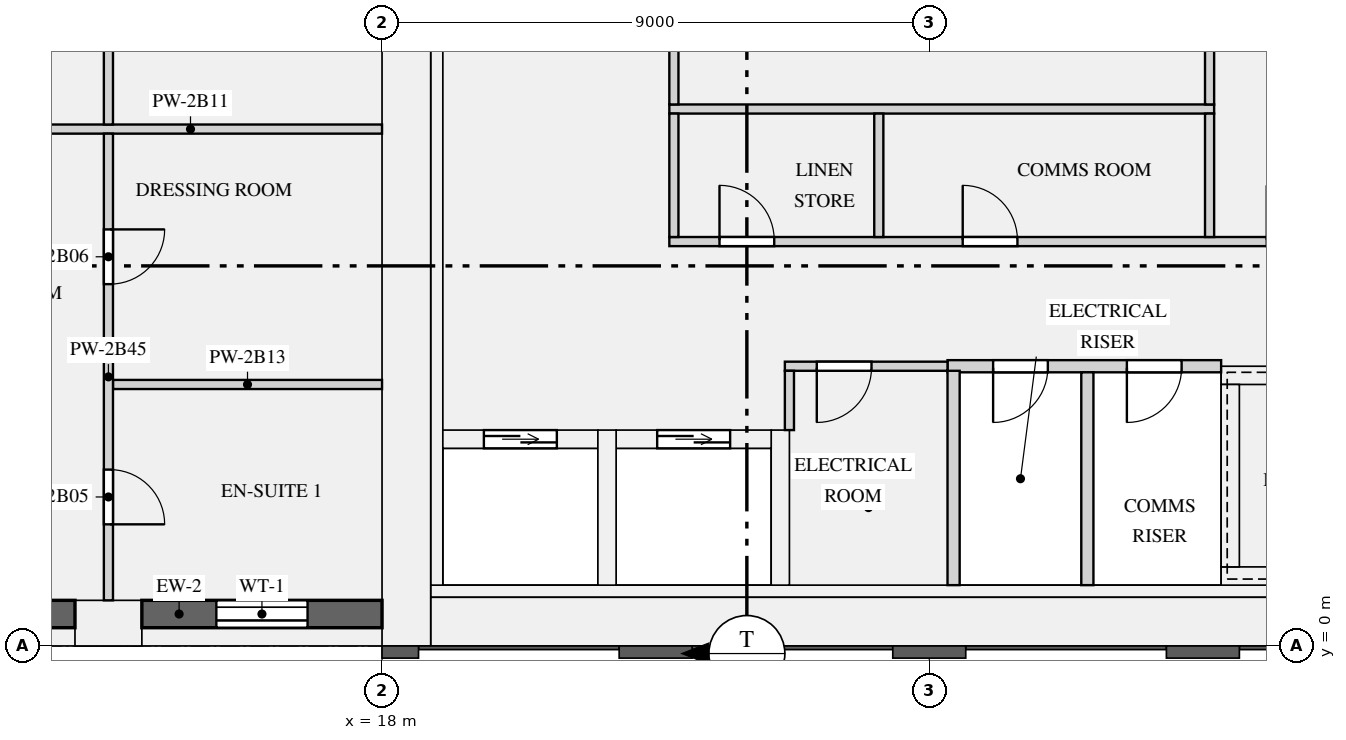
"""IFC4 building model, lengths in metres.
Left out: names, types, materials, properties, quantities, classifications, styles, units other than length and angle.
Written with IfcOpenShell. Run it as: python <this file> out.ifc"""

import sys

from ifc_helpers import new_model, si_unit, direction, frame, frame_2d, origin, origin_2d, place, context, subcontext, project, spatial, rectangle, extrude, element, fill, save


model = new_model("IFC4")
c1 = context("Model", 3, precision=1e-05, world=origin(), true_north=direction((0.0, 1.0)))
c2 = subcontext(c1, "Body", "Model", "MODEL_VIEW")
j1 = project(units=[si_unit("LENGTHUNIT", "METRE"), si_unit("PLANEANGLEUNIT", "RADIAN")], contexts=[c1])
p1 = place(None, origin())
s1 = spatial("IfcSite", under=j1, at=p1, CompositionType="ELEMENT")
p2 = place(p1, origin())
s2 = spatial("IfcBuilding", under=s1, at=p2, CompositionType="ELEMENT")
p3 = place(p2, frame((0.0, 0.0, 93.0)))
s3 = spatial("IfcBuildingStorey", under=s2, at=p3, CompositionType="ELEMENT", Elevation=93.0)
p4 = place(p3, frame((13.5, 0.375, 0.0), z_axis=(0.0, 0.0, 1.0), x_axis=(1.0, 0.0, 0.0)))
e1 = element("IfcColumn", 1, at=p4, inside=s3, PredefinedType="USERDEFINED", context=c2, shape_type="SweptSolid", body=[
    extrude(rectangle(XDim=1.1, YDim=0.75, at=origin_2d()), origin(), (0.0, 0.0, 1.0), 3.15),
])
p5 = place(p3, frame((18.4, 0.0, 0.0), z_axis=(0.0, 0.0, 1.0), x_axis=(0.0, 1.0, 0.0)))
e2 = element("IfcWall", 2, at=p5, inside=s3, PredefinedType="SHEAR", context=c2, shape_type="SweptSolid", body=[
    extrude(rectangle(XDim=12.5, YDim=0.8, at=frame_2d((6.25, 0.0))), origin(), (0.0, 0.0, 1.0), 3.15),
])
p6 = place(p3, frame((18.8, 0.4, 0.0), z_axis=(0.0, 0.0, 1.0), x_axis=(1.0, 0.0, 0.0)))
e3 = element("IfcWall", 3, at=p6, inside=s3, PredefinedType="SHEAR", context=c2, shape_type="SweptSolid", body=[
    extrude(rectangle(XDim=34.4, YDim=0.8, at=frame_2d((17.2, 0.0))), origin(), (0.0, 0.0, 1.0), 3.15),
])
p7 = place(p3, frame((18.9, 1.0, 0.0), z_axis=(0.0, 0.0, 1.0), x_axis=(0.0, 1.0, 0.0)))
e4 = element("IfcWall", 4, at=p7, inside=s3, PredefinedType="SHEAR", context=c2, shape_type="SweptSolid", body=[
    extrude(rectangle(XDim=10.9, YDim=0.2, at=frame_2d((5.45, 0.0))), origin(), (0.0, 0.0, 1.0), 3.15),
])
p8 = place(p3, frame((18.8, 0.9, 0.0), z_axis=(0.0, 0.0, 1.0), x_axis=(1.0, 0.0, 0.0)))
e5 = element("IfcWall", 5, at=p8, inside=s3, PredefinedType="SHEAR", context=c2, shape_type="SweptSolid", body=[
    extrude(rectangle(XDim=34.4, YDim=0.2, at=frame_2d((17.2, 0.0))), origin(), (0.0, 0.0, 1.0), 3.15),
])
p9 = place(p3, frame((19.0, 3.4, 0.0), z_axis=(0.0, 0.0, 1.0), x_axis=(1.0, 0.0, 0.0)))
e6 = element("IfcWall", 6, at=p9, inside=s3, PredefinedType="SHEAR", context=c2, shape_type="SweptSolid", body=[
    extrude(rectangle(XDim=2.55, YDim=0.3, at=frame_2d((1.275, 0.0))), origin(), (0.0, 0.0, 1.0), 3.15),
])
p10 = place(p9, frame((0.675, 0.0, 0.0)))
e7 = element("IfcOpeningElement", 7, at=p10, cuts=e6, PredefinedType="OPENING", context=c2, shape_type="SweptSolid", body=[
    extrude(rectangle(XDim=1.2, YDim=2.1, at=frame_2d((0.6, 1.05))), frame((0.0, 0.16, 0.0), z_axis=(0.0, -1.0, 0.0), x_axis=(1.0, 0.0, 0.0)), (0.0, 0.0, 1.0), 0.32),
])
p11 = place(p3, frame((21.85, 3.4, 0.0), z_axis=(0.0, 0.0, 1.0), x_axis=(1.0, 0.0, 0.0)))
e8 = element("IfcWall", 8, at=p11, inside=s3, PredefinedType="SHEAR", context=c2, shape_type="SweptSolid", body=[
    extrude(rectangle(XDim=2.55, YDim=0.3, at=frame_2d((1.275, 0.0))), origin(), (0.0, 0.0, 1.0), 3.15),
])
p12 = place(p11, frame((0.675, 0.0, 0.0)))
e9 = element("IfcOpeningElement", 9, at=p12, cuts=e8, PredefinedType="OPENING", context=c2, shape_type="SweptSolid", body=[
    extrude(rectangle(XDim=1.2, YDim=2.1, at=frame_2d((0.6, 1.05))), frame((0.0, 0.16, 0.0), z_axis=(0.0, -1.0, 0.0), x_axis=(1.0, 0.0, 0.0)), (0.0, 0.0, 1.0), 0.32),
])
for number, where, z_axis, x_axis in (
    (10, (21.7, 1.0, 0.0), (0.0, 0.0, 1.0), (0.0, 1.0, 0.0)),
    (11, (24.55, 1.0, 0.0), (0.0, 0.0, 1.0), (0.0, 1.0, 0.0)),
):
    element("IfcWall", number, at=place(p3, frame(where, z_axis=z_axis, x_axis=x_axis)), inside=s3, PredefinedType="SHEAR", context=c2, shape_type="SweptSolid", body=[
        extrude(rectangle(XDim=2.55, YDim=0.3, at=frame_2d((1.275, 0.0))), origin(), (0.0, 0.0, 1.0), 3.15),
    ])
p13 = place(p3, frame((31.8, 1.15, 0.0), z_axis=(0.0, 0.0, 1.0), x_axis=(1.0, 0.0, 0.0)))
e12 = element("IfcWall", 12, at=p13, inside=s3, PredefinedType="SHEAR", context=c2, shape_type="SweptSolid", body=[
    extrude(rectangle(XDim=8.4, YDim=0.3, at=frame_2d((4.2, 0.0))), origin(), (0.0, 0.0, 1.0), 3.15),
])
p14 = place(p3, frame((31.8, 4.45, 0.0), z_axis=(0.0, 0.0, 1.0), x_axis=(1.0, 0.0, 0.0)))
e13 = element("IfcWall", 13, at=p14, inside=s3, PredefinedType="SHEAR", context=c2, shape_type="SweptSolid", body=[
    extrude(rectangle(XDim=8.4, YDim=0.3, at=frame_2d((4.2, 0.0))), origin(), (0.0, 0.0, 1.0), 3.15),
])
p15 = place(p14, frame((6.8, 0.0, 0.0)))
e14 = element("IfcOpeningElement", 14, at=p15, cuts=e13, PredefinedType="OPENING", context=c2, shape_type="SweptSolid", body=[
    extrude(rectangle(XDim=1.1, YDim=2.1, at=frame_2d((0.55, 1.05))), frame((0.0, 0.16, 0.0), z_axis=(0.0, -1.0, 0.0), x_axis=(1.0, 0.0, 0.0)), (0.0, 0.0, 1.0), 0.32),
])
p16 = place(p3, frame((31.95, 1.3, 0.0), z_axis=(0.0, 0.0, 1.0), x_axis=(0.0, 1.0, 0.0)))
e15 = element("IfcWall", 15, at=p16, inside=s3, PredefinedType="SHEAR", context=c2, shape_type="SweptSolid", body=[
    extrude(rectangle(XDim=3.0, YDim=0.3, at=frame_2d((1.5, 0.0))), origin(), (0.0, 0.0, 1.0), 3.15),
])
p17 = place(p3, frame((10.1, 0.525, 0.9), z_axis=(0.0, 0.0, 1.0), x_axis=(1.0, 0.0, 0.0)))
e16 = element("IfcWall", 16, at=p17, inside=s3, PredefinedType="SOLIDWALL", context=c2, shape_type="SweptSolid", body=[
    extrude(rectangle(XDim=2.85, YDim=0.45, at=frame_2d((1.425, 0.0))), origin(), (0.0, 0.0, 1.0), 1.93),
])
p18 = place(p17, frame((0.675, 0.0, 0.15)))
e17 = element("IfcOpeningElement", 17, at=p18, cuts=e16, PredefinedType="OPENING", context=c2, shape_type="SweptSolid", body=[
    extrude(rectangle(XDim=1.5, YDim=1.5, at=frame_2d((0.75, 0.75))), frame((0.0, 0.235, 0.0), z_axis=(0.0, -1.0, 0.0), x_axis=(1.0, 0.0, 0.0)), (0.0, 0.0, 1.0), 0.47),
])
p19 = place(p3, frame((14.05, 0.525, 0.9), z_axis=(0.0, 0.0, 1.0), x_axis=(1.0, 0.0, 0.0)))
e18 = element("IfcWall", 18, at=p19, inside=s3, PredefinedType="SOLIDWALL", context=c2, shape_type="SweptSolid", body=[
    extrude(rectangle(XDim=3.95, YDim=0.45, at=frame_2d((1.975, 0.0))), origin(), (0.0, 0.0, 1.0), 1.93),
])
p20 = place(p19, frame((1.225, 0.0, 0.15)))
e19 = element("IfcOpeningElement", 19, at=p20, cuts=e18, PredefinedType="OPENING", context=c2, shape_type="SweptSolid", body=[
    extrude(rectangle(XDim=1.5, YDim=1.5, at=frame_2d((0.75, 0.75))), frame((0.0, 0.235, 0.0), z_axis=(0.0, -1.0, 0.0), x_axis=(1.0, 0.0, 0.0)), (0.0, 0.0, 1.0), 0.47),
])
p21 = place(p3, frame((27.3, 4.6, 0.0), z_axis=(0.0, 0.0, 1.0), x_axis=(1.0, 0.0, 0.0)))
e20 = element("IfcWall", 20, at=p21, inside=s3, PredefinedType="PARTITIONING", context=c2, shape_type="SweptSolid", body=[
    extrude(rectangle(XDim=4.5, YDim=0.2, at=frame_2d((2.25, 0.0))), origin(), (0.0, 0.0, 1.0), 2.83),
])
p22 = place(p21, frame((0.75, 0.0, 0.0)))
e21 = element("IfcOpeningElement", 21, at=p22, cuts=e20, PredefinedType="OPENING", context=c2, shape_type="SweptSolid", body=[
    extrude(rectangle(XDim=0.9, YDim=2.1, at=frame_2d((0.45, 1.05))), frame((0.0, 0.11, 0.0), z_axis=(0.0, -1.0, 0.0), x_axis=(1.0, 0.0, 0.0)), (0.0, 0.0, 1.0), 0.22),
])
p23 = place(p21, frame((2.95, 0.0, 0.0)))
e22 = element("IfcOpeningElement", 22, at=p23, cuts=e20, PredefinedType="OPENING", context=c2, shape_type="SweptSolid", body=[
    extrude(rectangle(XDim=0.9, YDim=2.1, at=frame_2d((0.45, 1.05))), frame((0.0, 0.11, 0.0), z_axis=(0.0, -1.0, 0.0), x_axis=(1.0, 0.0, 0.0)), (0.0, 0.0, 1.0), 0.22),
])
p24 = place(p3, frame((24.625, 4.6, 0.0), z_axis=(0.0, 0.0, 1.0), x_axis=(1.0, 0.0, 0.0)))
e23 = element("IfcWall", 23, at=p24, inside=s3, PredefinedType="PARTITIONING", context=c2, shape_type="SweptSolid", body=[
    extrude(rectangle(XDim=2.675, YDim=0.15, at=frame_2d((1.337, 0.0))), origin(), (0.0, 0.0, 1.0), 2.83),
])
p25 = place(p24, frame((0.525, 0.0, 0.0)))
e24 = element("IfcOpeningElement", 24, at=p25, cuts=e23, PredefinedType="OPENING", context=c2, shape_type="SweptSolid", body=[
    extrude(rectangle(XDim=0.9, YDim=2.1, at=frame_2d((0.45, 1.05))), frame((0.0, 0.085, 0.0), z_axis=(0.0, -1.0, 0.0), x_axis=(1.0, 0.0, 0.0)), (0.0, 0.0, 1.0), 0.17),
])
p26 = place(p3, frame((22.725, 6.65, 0.0), z_axis=(0.0, 0.0, 1.0), x_axis=(1.0, 0.0, 0.0)))
e25 = element("IfcWall", 25, at=p26, inside=s3, PredefinedType="PARTITIONING", context=c2, shape_type="SweptSolid", body=[
    extrude(rectangle(XDim=19.8, YDim=0.15, at=frame_2d((9.9, 0.0))), origin(), (0.0, 0.0, 1.0), 2.83),
])
p27 = place(p26, frame((0.825, 0.0, 0.0)))
e26 = element("IfcOpeningElement", 26, at=p27, cuts=e25, PredefinedType="OPENING", context=c2, shape_type="SweptSolid", body=[
    extrude(rectangle(XDim=0.9, YDim=2.1, at=frame_2d((0.45, 1.05))), frame((0.0, 0.085, 0.0), z_axis=(0.0, -1.0, 0.0), x_axis=(1.0, 0.0, 0.0)), (0.0, 0.0, 1.0), 0.17),
])
p28 = place(p26, frame((4.825, 0.0, 0.0)))
e27 = element("IfcOpeningElement", 27, at=p28, cuts=e25, PredefinedType="OPENING", context=c2, shape_type="SweptSolid", body=[
    extrude(rectangle(XDim=0.9, YDim=2.1, at=frame_2d((0.45, 1.05))), frame((0.0, 0.085, 0.0), z_axis=(0.0, -1.0, 0.0), x_axis=(1.0, 0.0, 0.0)), (0.0, 0.0, 1.0), 0.17),
])
p29 = place(p26, frame((9.825, 0.0, 0.0)))
e28 = element("IfcOpeningElement", 28, at=p29, cuts=e25, PredefinedType="OPENING", context=c2, shape_type="SweptSolid", body=[
    extrude(rectangle(XDim=0.9, YDim=2.1, at=frame_2d((0.45, 1.05))), frame((0.0, 0.085, 0.0), z_axis=(0.0, -1.0, 0.0), x_axis=(1.0, 0.0, 0.0)), (0.0, 0.0, 1.0), 0.17),
])
p30 = place(p26, frame((14.475, 0.0, 0.0)))
e29 = element("IfcOpeningElement", 29, at=p30, cuts=e25, PredefinedType="OPENING", context=c2, shape_type="SweptSolid", body=[
    extrude(rectangle(XDim=0.9, YDim=2.1, at=frame_2d((0.45, 1.05))), frame((0.0, 0.085, 0.0), z_axis=(0.0, -1.0, 0.0), x_axis=(1.0, 0.0, 0.0)), (0.0, 0.0, 1.0), 0.17),
])
p31 = place(p3, frame((22.725, 8.83, 0.0), z_axis=(0.0, 0.0, 1.0), x_axis=(1.0, 0.0, 0.0)))
e30 = element("IfcWall", 30, at=p31, inside=s3, PredefinedType="PARTITIONING", context=c2, shape_type="SweptSolid", body=[
    extrude(rectangle(XDim=8.96, YDim=0.15, at=frame_2d((4.48, 0.0))), origin(), (0.0, 0.0, 1.0), 2.83),
])
p32 = place(p3, frame((27.4, 1.0, 0.0), z_axis=(0.0, 0.0, 1.0), x_axis=(0.0, 1.0, 0.0)))
e31 = element("IfcWall", 31, at=p32, inside=s3, PredefinedType="PARTITIONING", context=c2, shape_type="SweptSolid", body=[
    extrude(rectangle(XDim=3.525, YDim=0.2, at=frame_2d((1.762, 0.0))), origin(), (0.0, 0.0, 1.0), 2.83),
])
p33 = place(p3, frame((29.6, 1.0, 0.0), z_axis=(0.0, 0.0, 1.0), x_axis=(0.0, 1.0, 0.0)))
e32 = element("IfcWall", 32, at=p33, inside=s3, PredefinedType="PARTITIONING", context=c2, shape_type="SweptSolid", body=[
    extrude(rectangle(XDim=3.5, YDim=0.2, at=frame_2d((1.75, 0.0))), origin(), (0.0, 0.0, 1.0), 2.83),
])
p34 = place(p3, frame((24.7, 3.55, 0.0), z_axis=(0.0, 0.0, 1.0), x_axis=(0.0, 1.0, 0.0)))
e33 = element("IfcWall", 33, at=p34, inside=s3, PredefinedType="PARTITIONING", context=c2, shape_type="SweptSolid", body=[
    extrude(rectangle(XDim=0.975, YDim=0.15, at=frame_2d((0.487, 0.0))), origin(), (0.0, 0.0, 1.0), 2.83),
])
for number, where, z_axis, x_axis in (
    (34, (22.8, 6.725, 0.0), (0.0, 0.0, 1.0), (0.0, 1.0, 0.0)),
    (35, (26.17, 6.725, 0.0), (0.0, 0.0, 1.0), (0.0, 1.0, 0.0)),
    (36, (31.61, 6.725, 0.0), (0.0, 0.0, 1.0), (0.0, 1.0, 0.0)),
):
    element("IfcWall", number, at=place(p3, frame(where, z_axis=z_axis, x_axis=x_axis)), inside=s3, PredefinedType="PARTITIONING", context=c2, shape_type="SweptSolid", body=[
        extrude(rectangle(XDim=2.03, YDim=0.15, at=frame_2d((1.015, 0.0))), origin(), (0.0, 0.0, 1.0), 2.83),
    ])
for number, where, z_axis, x_axis in (
    (37, (22.8, 8.905, 0.0), (0.0, 0.0, 1.0), (0.0, 1.0, 0.0)),
    (38, (31.61, 8.905, 0.0), (0.0, 0.0, 1.0), (0.0, 1.0, 0.0)),
):
    element("IfcWall", number, at=place(p3, frame(where, z_axis=z_axis, x_axis=x_axis)), inside=s3, PredefinedType="PARTITIONING", context=c2, shape_type="SweptSolid", body=[
        extrude(rectangle(XDim=2.995, YDim=0.15, at=frame_2d((1.498, 0.0))), origin(), (0.0, 0.0, 1.0), 2.83),
    ])
p35 = place(p3, frame((5.25, 8.5, 0.0), z_axis=(0.0, 0.0, 1.0), x_axis=(1.0, 0.0, 0.0)))
e39 = element("IfcWall", 39, at=p35, inside=s3, PredefinedType="PARTITIONING", context=c2, shape_type="SweptSolid", body=[
    extrude(rectangle(XDim=12.75, YDim=0.15, at=frame_2d((6.375, 0.0))), origin(), (0.0, 0.0, 1.0), 2.83),
])
p36 = place(p35, frame((5.55, 0.0, 0.0)))
e40 = element("IfcOpeningElement", 40, at=p36, cuts=e39, PredefinedType="OPENING", context=c2, shape_type="SweptSolid", body=[
    extrude(rectangle(XDim=0.9, YDim=2.1, at=frame_2d((0.45, 1.05))), frame((0.0, 0.085, 0.0), z_axis=(0.0, -1.0, 0.0), x_axis=(1.0, 0.0, 0.0)), (0.0, 0.0, 1.0), 0.17),
])
p37 = place(p3, frame((13.575, 4.3, 0.0), z_axis=(0.0, 0.0, 1.0), x_axis=(1.0, 0.0, 0.0)))
e41 = element("IfcWall", 41, at=p37, inside=s3, PredefinedType="PARTITIONING", context=c2, shape_type="SweptSolid", body=[
    extrude(rectangle(XDim=4.425, YDim=0.15, at=frame_2d((2.212, 0.0))), origin(), (0.0, 0.0, 1.0), 2.83),
])
p38 = place(p3, frame((13.5, 0.75, 0.0), z_axis=(0.0, 0.0, 1.0), x_axis=(0.0, 1.0, 0.0)))
e42 = element("IfcWall", 42, at=p38, inside=s3, PredefinedType="PARTITIONING", context=c2, shape_type="SweptSolid", body=[
    extrude(rectangle(XDim=7.675, YDim=0.15, at=frame_2d((3.837, 0.0))), origin(), (0.0, 0.0, 1.0), 2.83),
])
p39 = place(p38, frame((1.25, 0.0, 0.0)))
e43 = element("IfcOpeningElement", 43, at=p39, cuts=e42, PredefinedType="OPENING", context=c2, shape_type="SweptSolid", body=[
    extrude(rectangle(XDim=0.9, YDim=2.1, at=frame_2d((0.45, 1.05))), frame((0.0, 0.085, 0.0), z_axis=(0.0, -1.0, 0.0), x_axis=(1.0, 0.0, 0.0)), (0.0, 0.0, 1.0), 0.17),
])
p40 = place(p38, frame((5.2, 0.0, 0.0)))
e44 = element("IfcOpeningElement", 44, at=p40, cuts=e42, PredefinedType="OPENING", context=c2, shape_type="SweptSolid", body=[
    extrude(rectangle(XDim=0.9, YDim=2.1, at=frame_2d((0.45, 1.05))), frame((0.0, 0.085, 0.0), z_axis=(0.0, -1.0, 0.0), x_axis=(1.0, 0.0, 0.0)), (0.0, 0.0, 1.0), 0.17),
])
p41 = place(p3, frame((13.5, 8.575, 0.0), z_axis=(0.0, 0.0, 1.0), x_axis=(0.0, 1.0, 0.0)))
e45 = element("IfcWall", 45, at=p41, inside=s3, PredefinedType="PARTITIONING", context=c2, shape_type="SweptSolid", body=[
    extrude(rectangle(XDim=3.85, YDim=0.15, at=frame_2d((1.925, 0.0))), origin(), (0.0, 0.0, 1.0), 2.83),
])
p42 = place(p20, origin())
e46 = element("IfcWindow", 46, at=p42, inside=s3, PartitioningType="SINGLE_PANEL", PredefinedType="WINDOW", context=c2, shape_type="SweptSolid", body=[
    extrude(rectangle(XDim=1.5, YDim=1.5, at=frame_2d((0.75, 0.75))), frame((0.0, -0.065, 0.0), z_axis=(0.0, -1.0, 0.0), x_axis=(1.0, 0.0, 0.0)), (0.0, 0.0, 1.0), 0.06),
])
fill(e19, e46)
p43 = place(p10, origin())
e47 = element("IfcDoor", 47, at=p43, inside=s3, OperationType="DOUBLE_DOOR_SLIDING", PredefinedType="DOOR", context=c2, shape_type="SweptSolid", body=[
    extrude(rectangle(XDim=1.2, YDim=2.1, at=frame_2d((0.6, 1.05))), frame((0.0, 0.025, 0.0), z_axis=(0.0, -1.0, 0.0), x_axis=(1.0, 0.0, 0.0)), (0.0, 0.0, 1.0), 0.05),
])
fill(e7, e47)
p44 = place(p12, origin())
e48 = element("IfcDoor", 48, at=p44, inside=s3, OperationType="DOUBLE_DOOR_SLIDING", PredefinedType="DOOR", context=c2, shape_type="SweptSolid", body=[
    extrude(rectangle(XDim=1.2, YDim=2.1, at=frame_2d((0.6, 1.05))), frame((0.0, 0.025, 0.0), z_axis=(0.0, -1.0, 0.0), x_axis=(1.0, 0.0, 0.0)), (0.0, 0.0, 1.0), 0.05),
])
fill(e9, e48)
p45 = place(p25, frame((0.9, 0.0, 0.0), z_axis=(0.0, 0.0, 1.0), x_axis=(-1.0, 0.0, 0.0)))
e49 = element("IfcDoor", 49, at=p45, inside=s3, OperationType="SINGLE_SWING_RIGHT", PredefinedType="DOOR", context=c2, shape_type="SweptSolid", body=[
    extrude(rectangle(XDim=0.9, YDim=2.1, at=frame_2d((0.45, 1.05))), frame((0.0, 0.025, 0.0), z_axis=(0.0, -1.0, 0.0), x_axis=(1.0, 0.0, 0.0)), (0.0, 0.0, 1.0), 0.05),
])
fill(e24, e49)
p46 = place(p27, origin())
e50 = element("IfcDoor", 50, at=p46, inside=s3, OperationType="SINGLE_SWING_LEFT", PredefinedType="DOOR", context=c2, shape_type="SweptSolid", body=[
    extrude(rectangle(XDim=0.9, YDim=2.1, at=frame_2d((0.45, 1.05))), frame((0.0, 0.025, 0.0), z_axis=(0.0, -1.0, 0.0), x_axis=(1.0, 0.0, 0.0)), (0.0, 0.0, 1.0), 0.05),
])
fill(e26, e50)
p47 = place(p28, origin())
e51 = element("IfcDoor", 51, at=p47, inside=s3, OperationType="SINGLE_SWING_LEFT", PredefinedType="DOOR", context=c2, shape_type="SweptSolid", body=[
    extrude(rectangle(XDim=0.9, YDim=2.1, at=frame_2d((0.45, 1.05))), frame((0.0, 0.025, 0.0), z_axis=(0.0, -1.0, 0.0), x_axis=(1.0, 0.0, 0.0)), (0.0, 0.0, 1.0), 0.05),
])
fill(e27, e51)
p48 = place(p22, frame((0.9, 0.0, 0.0), z_axis=(0.0, 0.0, 1.0), x_axis=(-1.0, 0.0, 0.0)))
e52 = element("IfcDoor", 52, at=p48, inside=s3, OperationType="SINGLE_SWING_RIGHT", PredefinedType="DOOR", context=c2, shape_type="SweptSolid", body=[
    extrude(rectangle(XDim=0.9, YDim=2.1, at=frame_2d((0.45, 1.05))), frame((0.0, 0.025, 0.0), z_axis=(0.0, -1.0, 0.0), x_axis=(1.0, 0.0, 0.0)), (0.0, 0.0, 1.0), 0.05),
])
fill(e21, e52)
p49 = place(p23, frame((0.9, 0.0, 0.0), z_axis=(0.0, 0.0, 1.0), x_axis=(-1.0, 0.0, 0.0)))
e53 = element("IfcDoor", 53, at=p49, inside=s3, OperationType="SINGLE_SWING_RIGHT", PredefinedType="DOOR", context=c2, shape_type="SweptSolid", body=[
    extrude(rectangle(XDim=0.9, YDim=2.1, at=frame_2d((0.45, 1.05))), frame((0.0, 0.025, 0.0), z_axis=(0.0, -1.0, 0.0), x_axis=(1.0, 0.0, 0.0)), (0.0, 0.0, 1.0), 0.05),
])
fill(e22, e53)
p50 = place(p39, frame((0.9, 0.0, 0.0), z_axis=(0.0, 0.0, 1.0), x_axis=(-1.0, 0.0, 0.0)))
e54 = element("IfcDoor", 54, at=p50, inside=s3, OperationType="SINGLE_SWING_RIGHT", PredefinedType="DOOR", context=c2, shape_type="SweptSolid", body=[
    extrude(rectangle(XDim=0.9, YDim=2.1, at=frame_2d((0.45, 1.05))), frame((0.0, 0.025, 0.0), z_axis=(0.0, -1.0, 0.0), x_axis=(1.0, 0.0, 0.0)), (0.0, 0.0, 1.0), 0.05),
])
fill(e43, e54)
p51 = place(p40, frame((0.9, 0.0, 0.0), z_axis=(0.0, 0.0, 1.0), x_axis=(-1.0, 0.0, 0.0)))
e55 = element("IfcDoor", 55, at=p51, inside=s3, OperationType="SINGLE_SWING_LEFT", PredefinedType="DOOR", context=c2, shape_type="SweptSolid", body=[
    extrude(rectangle(XDim=0.9, YDim=2.1, at=frame_2d((0.45, 1.05))), frame((0.0, 0.025, 0.0), z_axis=(0.0, -1.0, 0.0), x_axis=(1.0, 0.0, 0.0)), (0.0, 0.0, 1.0), 0.05),
])
fill(e44, e55)
save(model, sys.argv[1])
